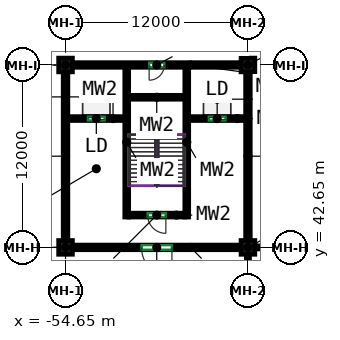
"""IFC4 building model, lengths in metres.
Left out: names, types, materials, properties, quantities, classifications, styles, units other than length and angle.
Written with IfcOpenShell. Run it as: python <this file> out.ifc"""

import sys

from ifc_helpers import new_model, si_unit, direction, frame, frame_2d, origin, origin_2d, place, context, subcontext, project, spatial, rectangle, extrude, source, transform, mapped, element, fill, save


model = new_model("IFC4")
c1 = context("Model", 3, precision=1e-05, world=origin(), true_north=direction((0.0, 1.0)))
c2 = subcontext(c1, "Body", "Model", "MODEL_VIEW")
j1 = project(units=[si_unit("LENGTHUNIT", "METRE"), si_unit("PLANEANGLEUNIT", "RADIAN")], contexts=[c1])
p1 = place(None, origin())
s1 = spatial("IfcSite", under=j1, at=p1, CompositionType="ELEMENT")
p2 = place(p1, origin())
s2 = spatial("IfcBuilding", under=s1, at=p2, CompositionType="ELEMENT")
p3 = place(p2, origin())
s3 = spatial("IfcBuildingStorey", under=s2, at=p3, CompositionType="ELEMENT", Elevation=0.0)
m1 = source(origin(), c2, "Body", "SweptSolid", [
    extrude(rectangle(XDim=0.9, YDim=0.9, at=origin_2d()), origin(), (0.0, 0.0, 1.0), 8.6),
])
for number, where, z_axis, x_axis in (
    (1, (-54.65, 42.65, 0.0), (0.0, 0.0, 1.0), (1.0, 0.0, 0.0)),
    (2, (-54.65, 54.65, 0.0), (0.0, 0.0, 1.0), (1.0, 0.0, 0.0)),
    (3, (-42.65, 42.65, 0.0), (0.0, 0.0, 1.0), (1.0, 0.0, 0.0)),
    (4, (-42.65, 54.65, 0.0), (0.0, 0.0, 1.0), (1.0, 0.0, 0.0)),
):
    element("IfcColumn", number, at=place(p3, frame(where, z_axis=z_axis, x_axis=x_axis)), inside=s3, PredefinedType="COLUMN", context=c2, shape_type="MappedRepresentation", body=[
        mapped(m1, transform((0.0, 0.0, 0.0))),
    ])
m2 = source(origin(), c2, "Body", "SweptSolid", [
    extrude(rectangle(XDim=11.1, YDim=0.3, at=frame_2d((5.55, 0.0))), origin(), (0.0, 0.0, 1.0), 7.7),
])
p4 = place(p3, frame((-43.1, 54.65, 0.0), z_axis=(0.0, 0.0, 1.0), x_axis=(-1.0, 0.0, 0.0)))
e5 = element("IfcWall", 5, at=p4, inside=s3, PredefinedType="SHEAR", context=c2, shape_type="MappedRepresentation", body=[
    mapped(m2, transform((0.0, 0.0, 0.0))),
])
p5 = place(p4, frame((5.05, 0.0, 0.0)))
e6 = element("IfcOpeningElement", 6, at=p5, cuts=e5, PredefinedType="OPENING", context=c2, shape_type="SweptSolid", body=[
    extrude(rectangle(XDim=1.0, YDim=2.1, at=frame_2d((0.5, 1.05))), frame((0.0, 0.16, 0.0), z_axis=(0.0, -1.0, 0.0), x_axis=(1.0, 0.0, 0.0)), (0.0, 0.0, 1.0), 0.32),
])
p6 = place(p3, frame((-43.1, 42.65, 0.0), z_axis=(0.0, 0.0, 1.0), x_axis=(-1.0, 0.0, 0.0)))
e7 = element("IfcWall", 7, at=p6, inside=s3, PredefinedType="SHEAR", context=c2, shape_type="MappedRepresentation", body=[
    mapped(m2, transform((0.0, 0.0, 0.0))),
])
p7 = place(p6, frame((4.55, 0.0, 0.0)))
e8 = element("IfcOpeningElement", 8, at=p7, cuts=e7, PredefinedType="OPENING", context=c2, shape_type="SweptSolid", body=[
    extrude(rectangle(XDim=2.0, YDim=2.4, at=frame_2d((1.0, 1.2))), frame((0.0, 0.16, 0.0), z_axis=(0.0, -1.0, 0.0), x_axis=(1.0, 0.0, 0.0)), (0.0, 0.0, 1.0), 0.32),
])
for number, where, z_axis, x_axis in (
    (9, (-42.65, 54.2, 0.0), (0.0, 0.0, 1.0), (0.0, -1.0, 0.0)),
    (10, (-54.65, 54.2, 0.0), (0.0, 0.0, 1.0), (0.0, -1.0, 0.0)),
):
    element("IfcWall", number, at=place(p3, frame(where, z_axis=z_axis, x_axis=x_axis)), inside=s3, PredefinedType="SHEAR", context=c2, shape_type="MappedRepresentation", body=[
        mapped(m2, transform((0.0, 0.0, 0.0))),
    ])
m3 = source(origin(), c2, "Body", "SweptSolid", [
    extrude(rectangle(XDim=9.85, YDim=0.25, at=frame_2d((4.925, 0.0))), origin(), (0.0, 0.0, 1.0), 8.6),
])
for number, where, z_axis, x_axis in (
    (11, (-46.675, 54.5, 0.0), (0.0, 0.0, 1.0), (0.0, -1.0, 0.0)),
    (12, (-50.625, 54.5, 0.0), (0.0, 0.0, 1.0), (0.0, -1.0, 0.0)),
):
    element("IfcWall", number, at=place(p3, frame(where, z_axis=z_axis, x_axis=x_axis)), inside=s3, PredefinedType="SHEAR", context=c2, shape_type="MappedRepresentation", body=[
        mapped(m3, transform((0.0, 0.0, 0.0))),
    ])
m4 = source(origin(), c2, "Body", "SweptSolid", [
    extrude(rectangle(XDim=3.7, YDim=0.25, at=frame_2d((1.85, 0.0))), origin(), (0.0, 0.0, 1.0), 8.6),
])
p8 = place(p3, frame((-46.8, 52.525, 0.0), z_axis=(0.0, 0.0, 1.0), x_axis=(-1.0, 0.0, 0.0)))
e13 = element("IfcWall", 13, at=p8, inside=s3, PredefinedType="SHEAR", context=c2, shape_type="MappedRepresentation", body=[
    mapped(m4, transform((0.0, 0.0, 0.0))),
])
p9 = place(p3, frame((-46.8, 44.775, 0.0), z_axis=(0.0, 0.0, 1.0), x_axis=(-1.0, 0.0, 0.0)))
e14 = element("IfcWall", 14, at=p9, inside=s3, PredefinedType="SHEAR", context=c2, shape_type="MappedRepresentation", body=[
    mapped(m4, transform((0.0, 0.0, 0.0))),
])
p10 = place(p9, frame((1.25, 0.0, 0.0)))
e15 = element("IfcOpeningElement", 15, at=p10, cuts=e14, PredefinedType="OPENING", context=c2, shape_type="SweptSolid", body=[
    extrude(rectangle(XDim=1.2, YDim=2.1, at=frame_2d((0.6, 1.05))), frame((0.0, 0.135, 0.0), z_axis=(0.0, -1.0, 0.0), x_axis=(1.0, 0.0, 0.0)), (0.0, 0.0, 1.0), 0.27),
])
m5 = source(origin(), c2, "Body", "SweptSolid", [
    extrude(rectangle(XDim=3.75, YDim=0.25, at=frame_2d((1.875, 0.0))), origin(), (0.0, 0.0, 1.0), 8.6),
])
p11 = place(p3, frame((-42.8, 51.125, 0.0), z_axis=(0.0, 0.0, 1.0), x_axis=(-1.0, 0.0, 0.0)))
e16 = element("IfcWall", 16, at=p11, inside=s3, PredefinedType="SHEAR", context=c2, shape_type="MappedRepresentation", body=[
    mapped(m5, transform((0.0, 0.0, 0.0))),
])
p12 = place(p11, frame((1.325, 0.0, 0.0)))
e17 = element("IfcOpeningElement", 17, at=p12, cuts=e16, PredefinedType="OPENING", context=c2, shape_type="SweptSolid", body=[
    extrude(rectangle(XDim=1.1, YDim=2.1, at=frame_2d((0.55, 1.05))), frame((0.0, 0.135, 0.0), z_axis=(0.0, -1.0, 0.0), x_axis=(1.0, 0.0, 0.0)), (0.0, 0.0, 1.0), 0.27),
])
m6 = source(origin(), c2, "Body", "SweptSolid", [
    extrude(rectangle(XDim=3.5, YDim=0.25, at=frame_2d((1.75, 0.0))), origin(), (0.0, 0.0, 1.0), 8.6),
])
p13 = place(p3, frame((-51.0, 51.125, 0.0), z_axis=(0.0, 0.0, 1.0), x_axis=(-1.0, 0.0, 0.0)))
e18 = element("IfcWall", 18, at=p13, inside=s3, PredefinedType="SHEAR", context=c2, shape_type="MappedRepresentation", body=[
    mapped(m6, transform((0.0, 0.0, 0.0))),
])
p14 = place(p13, frame((1.075, 0.0, 0.0)))
e19 = element("IfcOpeningElement", 19, at=p14, cuts=e18, PredefinedType="OPENING", context=c2, shape_type="SweptSolid", body=[
    extrude(rectangle(XDim=1.1, YDim=2.1, at=frame_2d((0.55, 1.05))), frame((0.0, 0.135, 0.0), z_axis=(0.0, -1.0, 0.0), x_axis=(1.0, 0.0, 0.0)), (0.0, 0.0, 1.0), 0.27),
])
m7 = source(origin(), c2, "Body", "SweptSolid", [
    extrude(rectangle(XDim=11.1, YDim=0.2, at=frame_2d((5.55, 0.0))), origin(), (0.0, 0.0, 1.0), 7.7),
])
p15 = place(p3, frame((-42.65, 31.1, 0.0), z_axis=(0.0, 0.0, 1.0), x_axis=(0.0, 1.0, 0.0)))
e20 = element("IfcWall", 20, at=p15, inside=s3, PredefinedType="PARTITIONING", context=c2, shape_type="MappedRepresentation", body=[
    mapped(m7, transform((0.0, 0.0, 0.0))),
])
p16 = place(p15, frame((4.35, 0.0, 0.0)))
e21 = element("IfcOpeningElement", 21, at=p16, cuts=e20, PredefinedType="OPENING", context=c2, shape_type="SweptSolid", body=[
    extrude(rectangle(XDim=2.4, YDim=2.4, at=frame_2d((1.2, 1.2))), frame((0.0, 0.11, 0.0), z_axis=(0.0, -1.0, 0.0), x_axis=(1.0, 0.0, 0.0)), (0.0, 0.0, 1.0), 0.22),
])
m8 = source(origin(), c2, "Body", "SweptSolid", [
    extrude(rectangle(XDim=1.75, YDim=0.2, at=frame_2d((0.875, 0.0))), origin(), (0.0, 0.0, 1.0), 8.6),
])
p17 = place(p3, frame((-42.65, 56.85, 0.0), z_axis=(0.0, 0.0, 1.0), x_axis=(0.0, -1.0, 0.0)))
e22 = element("IfcWall", 22, at=p17, inside=s3, PredefinedType="PARTITIONING", context=c2, shape_type="MappedRepresentation", body=[
    mapped(m8, transform((0.0, 0.0, 0.0))),
])
p18 = place(p3, frame((-42.2, 42.65, 0.0), z_axis=(0.0, 0.0, 1.0), x_axis=(1.0, 0.0, 0.0)))
e23 = element("IfcWall", 23, at=p18, inside=s3, PredefinedType="PARTITIONING", context=c2, shape_type="MappedRepresentation", body=[
    mapped(m7, transform((0.0, 0.0, 0.0))),
])
p19 = place(p10, origin())
e24 = element("IfcDoor", 24, at=p19, inside=s3, OperationType="DOUBLE_DOOR_SINGLE_SWING", PredefinedType="DOOR", context=c2, shape_type="SweptSolid", body=[
    extrude(rectangle(XDim=1.2, YDim=2.1, at=frame_2d((0.6, 1.05))), frame((0.0, 0.025, 0.0), z_axis=(0.0, -1.0, 0.0), x_axis=(1.0, 0.0, 0.0)), (0.0, 0.0, 1.0), 0.05),
])
fill(e15, e24)
p20 = place(p7, origin())
e25 = element("IfcDoor", 25, at=p20, inside=s3, OperationType="DOUBLE_DOOR_SINGLE_SWING", PredefinedType="DOOR", context=c2, shape_type="SweptSolid", body=[
    extrude(rectangle(XDim=2.0, YDim=2.4, at=frame_2d((1.0, 1.2))), frame((0.0, 0.025, 0.0), z_axis=(0.0, -1.0, 0.0), x_axis=(1.0, 0.0, 0.0)), (0.0, 0.0, 1.0), 0.05),
])
fill(e8, e25)
p21 = place(p12, origin())
e26 = element("IfcDoor", 26, at=p21, inside=s3, OperationType="SLIDING_TO_LEFT", PredefinedType="DOOR", context=c2, shape_type="SweptSolid", body=[
    extrude(rectangle(XDim=1.1, YDim=2.1, at=frame_2d((0.55, 1.05))), frame((0.0, 0.025, 0.0), z_axis=(0.0, -1.0, 0.0), x_axis=(1.0, 0.0, 0.0)), (0.0, 0.0, 1.0), 0.05),
])
fill(e17, e26)
p22 = place(p14, origin())
e27 = element("IfcDoor", 27, at=p22, inside=s3, OperationType="SLIDING_TO_LEFT", PredefinedType="DOOR", context=c2, shape_type="SweptSolid", body=[
    extrude(rectangle(XDim=1.1, YDim=2.1, at=frame_2d((0.55, 1.05))), frame((0.0, 0.025, 0.0), z_axis=(0.0, -1.0, 0.0), x_axis=(1.0, 0.0, 0.0)), (0.0, 0.0, 1.0), 0.05),
])
fill(e19, e27)
p23 = place(p5, origin())
e28 = element("IfcDoor", 28, at=p23, inside=s3, OperationType="SINGLE_SWING_RIGHT", PredefinedType="DOOR", context=c2, shape_type="SweptSolid", body=[
    extrude(rectangle(XDim=1.0, YDim=2.1, at=frame_2d((0.5, 1.05))), frame((0.0, 0.025, 0.0), z_axis=(0.0, -1.0, 0.0), x_axis=(1.0, 0.0, 0.0)), (0.0, 0.0, 1.0), 0.05),
])
fill(e6, e28)
save(model, sys.argv[1])
